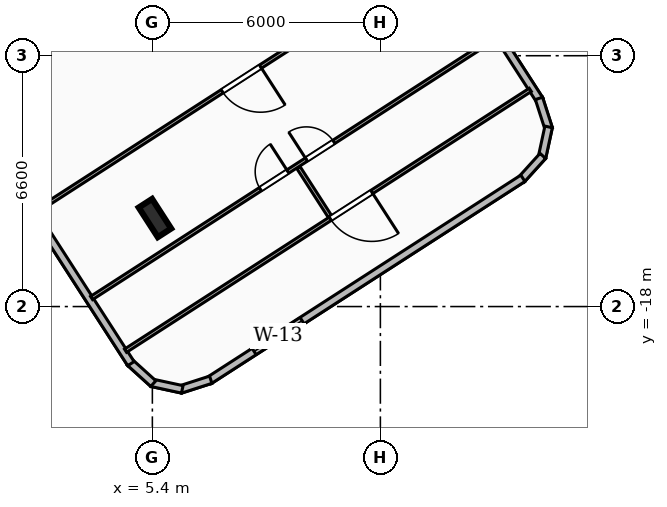
"""IFC4 building model, lengths in metres.
Left out: names, types, materials, properties, quantities, classifications, styles, units other than length and angle.
Written with IfcOpenShell. Run it as: python <this file> out.ifc"""

import sys

from ifc_helpers import new_model, si_unit, direction, frame, frame_2d, origin, origin_2d, place, context, subcontext, project, spatial, rectangle, i_section, extrude, element, fill, save


model = new_model("IFC4")
c1 = context("Model", 3, precision=1e-05, world=origin(), true_north=direction((0.0, 1.0)))
c2 = subcontext(c1, "Body", "Model", "MODEL_VIEW")
j1 = project(units=[si_unit("LENGTHUNIT", "METRE"), si_unit("PLANEANGLEUNIT", "RADIAN")], contexts=[c1])
p1 = place(None, origin())
s1 = spatial("IfcSite", under=j1, at=p1, CompositionType="ELEMENT")
p2 = place(p1, origin())
s2 = spatial("IfcBuilding", under=s1, at=p2, CompositionType="ELEMENT")
p3 = place(p2, frame((0.0, 0.0, 218.88)))
s3 = spatial("IfcBuildingStorey", under=s2, at=p3, CompositionType="ELEMENT", Elevation=218.88)
p4 = place(p3, frame((5.468, -15.671, 0.0), z_axis=(0.0, 0.0, 1.0), x_axis=(0.840566603496, 0.541708210283, 0.0)))
e1 = element("IfcColumn", 1, at=p4, inside=s3, PredefinedType="COLUMN", context=c2, shape_type="SweptSolid", body=[
    extrude(i_section(OverallWidth=0.418, OverallDepth=0.927, WebThickness=0.019, FlangeThickness=0.032, at=origin_2d()), origin(), (0.0, 0.0, 1.0), 3.42),
])
p5 = place(p3, frame((13.08, -8.666, 0.0), z_axis=(0.0, 0.0, 1.0), x_axis=(0.541732711374, -0.840550813114, 0.0)))
e2 = element("IfcWall", 2, at=p5, inside=s3, PredefinedType="SOLIDWALL", context=c2, shape_type="SweptSolid", body=[
    extrude(rectangle(XDim=4.642, YDim=0.2, at=frame_2d((2.321, 0.0))), origin(), (0.0, 0.0, 1.0), 3.14),
])
p6 = place(p3, frame((15.573, -12.523, 0.0), z_axis=(0.0, 0.0, 1.0), x_axis=(0.306602907463, -0.951837516142, 0.0)))
e3 = element("IfcWall", 3, at=p6, inside=s3, PredefinedType="SOLIDWALL", context=c2, shape_type="SweptSolid", body=[
    extrude(rectangle(XDim=0.838, YDim=0.2, at=frame_2d((0.419, 0.0))), origin(), (0.0, 0.0, 1.0), 3.14),
])
p7 = place(p3, frame((15.827, -13.273, 0.0), z_axis=(0.0, 0.0, 1.0), x_axis=(-0.210782404691, -0.977533006027, 0.0)))
e4 = element("IfcWall", 4, at=p7, inside=s3, PredefinedType="SOLIDWALL", context=c2, shape_type="SweptSolid", body=[
    extrude(rectangle(XDim=0.825, YDim=0.2, at=frame_2d((0.412, 0.0))), origin(), (0.0, 0.0, 1.0), 3.14),
])
p8 = place(p3, frame((15.675, -14.036, 0.0), z_axis=(0.0, 0.0, 1.0), x_axis=(-0.671019988703, -0.741439258983, 0.0)))
e5 = element("IfcWall", 5, at=p8, inside=s3, PredefinedType="SOLIDWALL", context=c2, shape_type="SweptSolid", body=[
    extrude(rectangle(XDim=0.839, YDim=0.2, at=frame_2d((0.419, 0.0))), origin(), (0.0, 0.0, 1.0), 3.14),
])
p9 = place(p3, frame((15.15, -14.625, 0.0), z_axis=(0.0, 0.0, 1.0), x_axis=(-0.84055619882, -0.541724354839, 0.0)))
e6 = element("IfcWall", 6, at=p9, inside=s3, PredefinedType="SOLIDWALL", context=c2, shape_type="SweptSolid", body=[
    extrude(rectangle(XDim=9.824, YDim=0.2, at=frame_2d((4.912, 0.0))), origin(), (0.0, 0.0, 1.0), 3.14),
])
p10 = place(p9, frame((6.913, 0.0, 0.85)))
e7 = element("IfcOpeningElement", 7, at=p10, cuts=e6, PredefinedType="OPENING", context=c2, shape_type="SweptSolid", body=[
    extrude(rectangle(XDim=1.5, YDim=1.8, at=frame_2d((0.75, 0.9))), frame((0.0, 0.11, 0.0), z_axis=(0.0, -1.0, 0.0), x_axis=(1.0, 0.0, 0.0)), (0.0, 0.0, 1.0), 0.22),
])
p11 = place(p3, frame((6.937, -19.925, 0.0), z_axis=(0.0, 0.0, 1.0), x_axis=(-0.951922461344, -0.306339072907, 0.0)))
e8 = element("IfcWall", 8, at=p11, inside=s3, PredefinedType="SOLIDWALL", context=c2, shape_type="SweptSolid", body=[
    extrude(rectangle(XDim=0.838, YDim=0.2, at=frame_2d((0.419, 0.0))), origin(), (0.0, 0.0, 1.0), 3.14),
])
p12 = place(p3, frame((6.187, -20.179, 0.0), z_axis=(0.0, 0.0, 1.0), x_axis=(-0.977405889656, 0.211371064399, 0.0)))
e9 = element("IfcWall", 9, at=p12, inside=s3, PredefinedType="SOLIDWALL", context=c2, shape_type="SweptSolid", body=[
    extrude(rectangle(XDim=0.823, YDim=0.2, at=frame_2d((0.412, 0.0))), origin(), (0.0, 0.0, 1.0), 3.14),
])
p13 = place(p3, frame((5.425, -20.027, 0.0), z_axis=(0.0, 0.0, 1.0), x_axis=(-0.741439258983, 0.671019988703, 0.0)))
e10 = element("IfcWall", 10, at=p13, inside=s3, PredefinedType="SOLIDWALL", context=c2, shape_type="SweptSolid", body=[
    extrude(rectangle(XDim=0.839, YDim=0.2, at=frame_2d((0.419, 0.0))), origin(), (0.0, 0.0, 1.0), 3.14),
])
p14 = place(p3, frame((4.836, -19.502, 0.0), z_axis=(0.0, 0.0, 1.0), x_axis=(-0.541756659411, 0.840535378187, 0.0)))
e11 = element("IfcWall", 11, at=p14, inside=s3, PredefinedType="SOLIDWALL", context=c2, shape_type="SweptSolid", body=[
    extrude(rectangle(XDim=4.642, YDim=0.2, at=frame_2d((2.321, 0.0))), origin(), (0.0, 0.0, 1.0), 3.14),
])
p15 = place(p3, frame((16.331, -6.476, 0.0), z_axis=(0.0, 0.0, 1.0), x_axis=(-0.840579457381, -0.541688264437, 0.0)))
e12 = element("IfcWall", 12, at=p15, inside=s3, PredefinedType="PARTITIONING", context=c2, shape_type="SweptSolid", body=[
    extrude(rectangle(XDim=20.238, YDim=0.1, at=frame_2d((10.119, 0.0))), origin(), (0.0, 0.0, 1.0), 2.51),
])
p16 = place(p15, frame((9.619, 0.0, 0.0)))
e13 = element("IfcOpeningElement", 13, at=p16, cuts=e12, PredefinedType="OPENING", context=c2, shape_type="SweptSolid", body=[
    extrude(rectangle(XDim=1.2, YDim=2.1, at=frame_2d((0.6, 1.05))), frame((0.0, 0.06, 0.0), z_axis=(0.0, -1.0, 0.0), x_axis=(1.0, 0.0, 0.0)), (0.0, 0.0, 1.0), 0.12),
])
p17 = place(p3, frame((9.242, -14.34, 0.0), z_axis=(0.0, 0.0, 1.0), x_axis=(0.541443159102, -0.840737358193, 0.0)))
e14 = element("IfcWall", 14, at=p17, inside=s3, PredefinedType="PARTITIONING", context=c2, shape_type="SweptSolid", body=[
    extrude(rectangle(XDim=1.53, YDim=0.1, at=frame_2d((0.765, 0.0))), origin(), (0.0, 0.0, 1.0), 3.14),
])
p18 = place(p3, frame((3.8, -17.775, 0.0), z_axis=(0.0, 0.0, 1.0), x_axis=(0.840588193286, 0.54167470802, 0.0)))
e15 = element("IfcWall", 15, at=p18, inside=s3, PredefinedType="PARTITIONING", context=c2, shape_type="SweptSolid", body=[
    extrude(rectangle(XDim=12.67, YDim=0.1, at=frame_2d((6.335, 0.0))), origin(), (0.0, 0.0, 1.0), 3.14),
])
p19 = place(p18, frame((5.285, 0.0, 0.0)))
e16 = element("IfcOpeningElement", 16, at=p19, cuts=e15, PredefinedType="OPENING", context=c2, shape_type="SweptSolid", body=[
    extrude(rectangle(XDim=0.86, YDim=2.04, at=frame_2d((0.43, 1.02))), frame((0.0, 0.06, 0.0), z_axis=(0.0, -1.0, 0.0), x_axis=(1.0, 0.0, 0.0)), (0.0, 0.0, 1.0), 0.12),
])
p20 = place(p18, frame((6.725, 0.0, 0.0)))
e17 = element("IfcOpeningElement", 17, at=p20, cuts=e15, PredefinedType="OPENING", context=c2, shape_type="SweptSolid", body=[
    extrude(rectangle(XDim=0.86, YDim=2.04, at=frame_2d((0.43, 1.02))), frame((0.0, 0.06, 0.0), z_axis=(0.0, -1.0, 0.0), x_axis=(1.0, 0.0, 0.0)), (0.0, 0.0, 1.0), 0.12),
])
p21 = place(p3, frame((15.344, -12.299, 0.0), z_axis=(0.0, 0.0, 1.0), x_axis=(-0.840579419228, -0.541688323642, 0.0)))
e18 = element("IfcWall", 18, at=p21, inside=s3, PredefinedType="PARTITIONING", context=c2, shape_type="SweptSolid", body=[
    extrude(rectangle(XDim=12.67, YDim=0.1, at=frame_2d((6.335, 0.0))), origin(), (0.0, 0.0, 1.0), 3.14),
])
p22 = place(p21, frame((4.96, 0.0, 0.0)))
e19 = element("IfcOpeningElement", 19, at=p22, cuts=e18, PredefinedType="OPENING", context=c2, shape_type="SweptSolid", body=[
    extrude(rectangle(XDim=1.3, YDim=2.1, at=frame_2d((0.65, 1.05))), frame((0.0, 0.06, 0.0), z_axis=(0.0, -1.0, 0.0), x_axis=(1.0, 0.0, 0.0)), (0.0, 0.0, 1.0), 0.12),
])
p23 = place(p10, origin())
e20 = element("IfcWindow", 20, at=p23, inside=s3, PartitioningType="SINGLE_PANEL", PredefinedType="WINDOW", context=c2, shape_type="SweptSolid", body=[
    extrude(rectangle(XDim=1.5, YDim=1.8, at=frame_2d((0.75, 0.9))), frame((0.0, 0.03, 0.0), z_axis=(0.0, -1.0, 0.0), x_axis=(1.0, 0.0, 0.0)), (0.0, 0.0, 1.0), 0.06),
])
fill(e7, e20)
p24 = place(p16, origin())
e21 = element("IfcDoor", 21, at=p24, inside=s3, OperationType="SINGLE_SWING_LEFT", PredefinedType="DOOR", context=c2, shape_type="SweptSolid", body=[
    extrude(rectangle(XDim=1.2, YDim=2.1, at=frame_2d((0.6, 1.05))), frame((0.0, 0.025, 0.0), z_axis=(0.0, -1.0, 0.0), x_axis=(1.0, 0.0, 0.0)), (0.0, 0.0, 1.0), 0.05),
])
fill(e13, e21)
p25 = place(p19, origin())
e22 = element("IfcDoor", 22, at=p25, inside=s3, OperationType="SINGLE_SWING_RIGHT", PredefinedType="DOOR", context=c2, shape_type="SweptSolid", body=[
    extrude(rectangle(XDim=0.86, YDim=2.04, at=frame_2d((0.43, 1.02))), frame((0.0, 0.025, 0.0), z_axis=(0.0, -1.0, 0.0), x_axis=(1.0, 0.0, 0.0)), (0.0, 0.0, 1.0), 0.05),
])
fill(e16, e22)
p26 = place(p20, origin())
e23 = element("IfcDoor", 23, at=p26, inside=s3, OperationType="SINGLE_SWING_LEFT", PredefinedType="DOOR", context=c2, shape_type="SweptSolid", body=[
    extrude(rectangle(XDim=0.86, YDim=2.04, at=frame_2d((0.43, 1.02))), frame((0.0, 0.025, 0.0), z_axis=(0.0, -1.0, 0.0), x_axis=(1.0, 0.0, 0.0)), (0.0, 0.0, 1.0), 0.05),
])
fill(e17, e23)
p27 = place(p22, origin())
e24 = element("IfcDoor", 24, at=p27, inside=s3, OperationType="SINGLE_SWING_LEFT", PredefinedType="DOOR", context=c2, shape_type="SweptSolid", body=[
    extrude(rectangle(XDim=1.3, YDim=2.1, at=frame_2d((0.65, 1.05))), frame((0.0, 0.025, 0.0), z_axis=(0.0, -1.0, 0.0), x_axis=(1.0, 0.0, 0.0)), (0.0, 0.0, 1.0), 0.05),
])
fill(e19, e24)
save(model, sys.argv[1])
